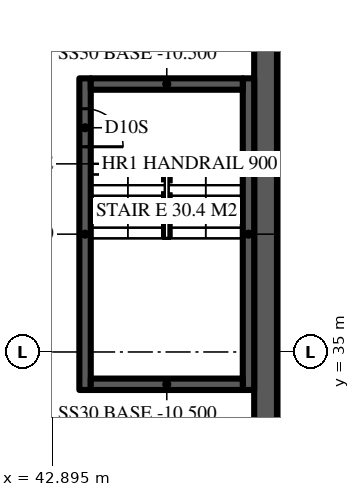
"""IFC4 building model, lengths in metres.
Left out: names, types, materials, properties, quantities, classifications, styles, units other than length and angle.
Written with IfcOpenShell. Run it as: python <this file> out.ifc"""

import sys

from ifc_helpers import new_model, si_unit, direction, frame, frame_2d, origin, place, context, subcontext, project, spatial, rectangle, extrude, element, fill, save


model = new_model("IFC4")
c1 = context("Model", 3, precision=1e-05, world=origin(), true_north=direction((0.0, 1.0)))
c2 = subcontext(c1, "Body", "Model", "MODEL_VIEW")
j1 = project(units=[si_unit("LENGTHUNIT", "METRE"), si_unit("PLANEANGLEUNIT", "RADIAN")], contexts=[c1])
p1 = place(None, origin())
s1 = spatial("IfcSite", under=j1, at=p1, CompositionType="ELEMENT")
p2 = place(p1, origin())
s2 = spatial("IfcBuilding", under=s1, at=p2, CompositionType="ELEMENT")
p3 = place(p2, frame((0.0, 0.0, -10.0)))
s3 = spatial("IfcBuildingStorey", under=s2, at=p3, CompositionType="ELEMENT", Elevation=-10.0)
p4 = place(p3, frame((48.5, -48.2, -0.5), z_axis=(0.0, 0.0, 1.0), x_axis=(0.0, 1.0, 0.0)))
e1 = element("IfcWall", 1, at=p4, inside=s3, PredefinedType="SOLIDWALL", context=c2, shape_type="SweptSolid", body=[
    extrude(rectangle(XDim=96.4, YDim=0.6, at=frame_2d((48.2, 0.0))), origin(), (0.0, 0.0, 1.0), 10.1),
])
p5 = place(p3, frame((43.75, 42.2, -0.5), z_axis=(0.0, 0.0, 1.0), x_axis=(0.0, -1.0, 0.0)))
e2 = element("IfcWall", 2, at=p5, inside=s3, PredefinedType="SOLIDWALL", context=c2, shape_type="SweptSolid", body=[
    extrude(rectangle(XDim=8.2, YDim=0.3, at=frame_2d((4.1, 0.0))), origin(), (0.0, 0.0, 1.0), 5.2),
])
p6 = place(p5, frame((0.8, 0.0, 0.5)))
e3 = element("IfcOpeningElement", 3, at=p6, cuts=e2, PredefinedType="OPENING", context=c2, shape_type="SweptSolid", body=[
    extrude(rectangle(XDim=1.0, YDim=2.2, at=frame_2d((0.5, 1.1))), frame((0.0, 0.16, 0.0), z_axis=(0.0, -1.0, 0.0), x_axis=(1.0, 0.0, 0.0)), (0.0, 0.0, 1.0), 0.32),
])
p7 = place(p3, frame((48.05, 34.0, -0.5), z_axis=(0.0, 0.0, 1.0), x_axis=(0.0, 1.0, 0.0)))
e4 = element("IfcWall", 4, at=p7, inside=s3, PredefinedType="SOLIDWALL", context=c2, shape_type="SweptSolid", body=[
    extrude(rectangle(XDim=8.2, YDim=0.3, at=frame_2d((4.1, 0.0))), origin(), (0.0, 0.0, 1.0), 5.2),
])
for number, where, z_axis, x_axis in (
    (5, (43.9, 42.05, -0.5), (0.0, 0.0, 1.0), (1.0, 0.0, 0.0)),
    (6, (47.9, 34.15, -0.5), (0.0, 0.0, 1.0), (-1.0, 0.0, 0.0)),
):
    element("IfcWall", number, at=place(p3, frame(where, z_axis=z_axis, x_axis=x_axis)), inside=s3, PredefinedType="SOLIDWALL", context=c2, shape_type="SweptSolid", body=[
        extrude(rectangle(XDim=4.0, YDim=0.3, at=frame_2d((2.0, 0.0))), origin(), (0.0, 0.0, 1.0), 5.2),
    ])
p8 = place(p6, origin())
e7 = element("IfcDoor", 7, at=p8, inside=s3, OperationType="SINGLE_SWING_RIGHT", PredefinedType="DOOR", context=c2, shape_type="SweptSolid", body=[
    extrude(rectangle(XDim=1.0, YDim=2.2, at=frame_2d((0.5, 1.1))), frame((0.0, 0.025, 0.0), z_axis=(0.0, -1.0, 0.0), x_axis=(1.0, 0.0, 0.0)), (0.0, 0.0, 1.0), 0.05),
])
fill(e3, e7)
save(model, sys.argv[1])
